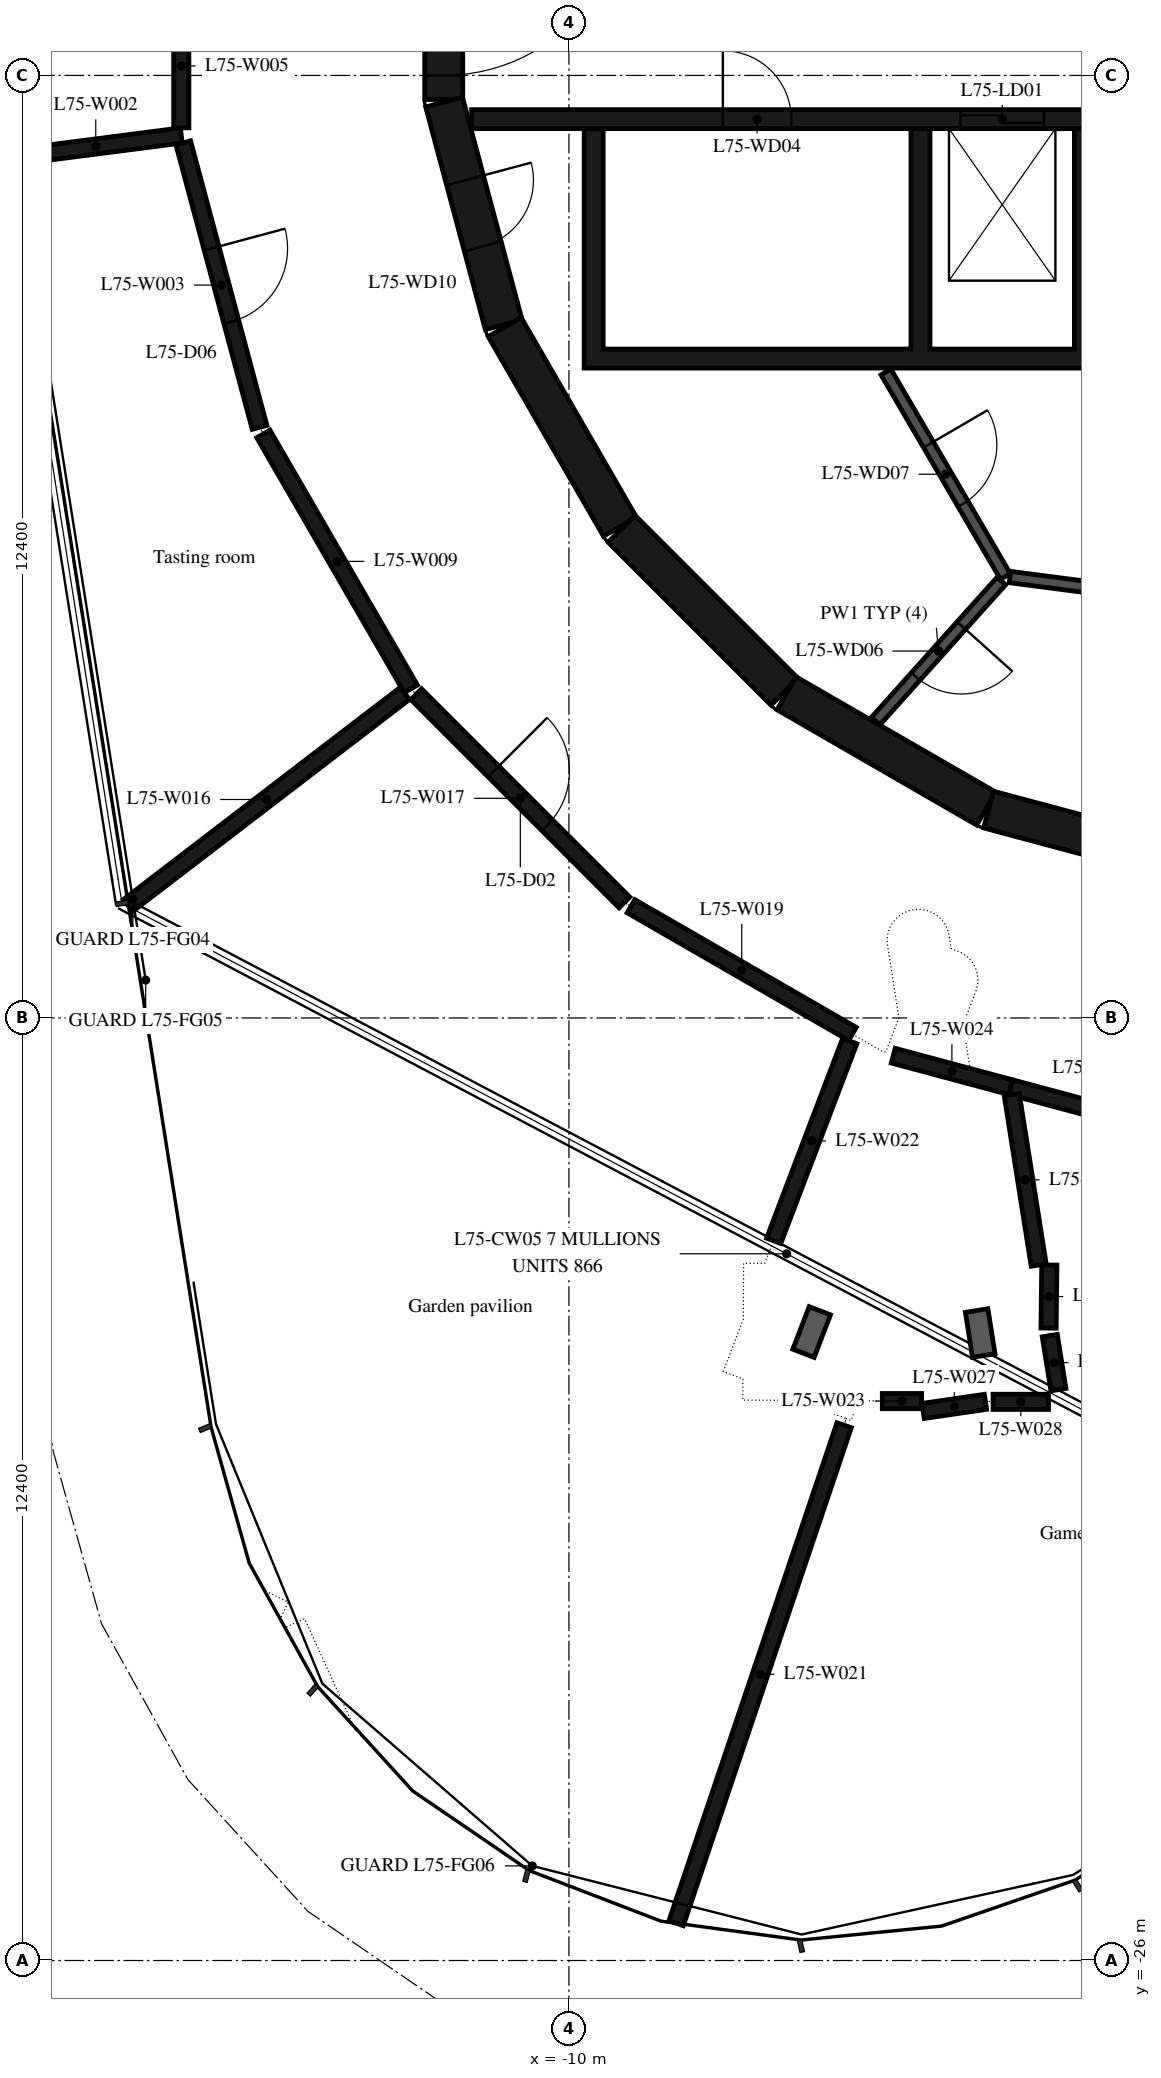
"""IFC4 building model, lengths in metres.
Left out: names, types, materials, properties, quantities, classifications, styles, units other than length and angle.
Written with IfcOpenShell. Run it as: python <this file> out.ifc"""

import sys

from ifc_helpers import new_model, si_unit, direction, frame, frame_2d, origin, place, context, subcontext, project, spatial, polyline, rectangle, outline, extrude, element, fill, save


model = new_model("IFC4")
c1 = context("Model", 3, precision=1e-05, world=origin(), true_north=direction((0.0, 1.0)))
c2 = subcontext(c1, "Body", "Model", "MODEL_VIEW")
j1 = project(units=[si_unit("LENGTHUNIT", "METRE"), si_unit("PLANEANGLEUNIT", "RADIAN")], contexts=[c1])
p1 = place(None, origin())
s1 = spatial("IfcSite", under=j1, at=p1, CompositionType="ELEMENT")
p2 = place(p1, origin())
s2 = spatial("IfcBuilding", under=s1, at=p2, CompositionType="ELEMENT")
p3 = place(p2, frame((0.0, 0.0, 291.4)))
s3 = spatial("IfcBuildingStorey", under=s2, at=p3, CompositionType="ELEMENT", Elevation=291.4)
p4 = place(p3, frame((-11.647, 1.516, 0.0), z_axis=(0.0, 0.0, 1.0), x_axis=(0.0, -1.0, 0.0)))
e1 = element("IfcWall", 1, at=p4, inside=s3, PredefinedType="SHEAR", context=c2, shape_type="SweptSolid", body=[
    extrude(rectangle(XDim=3.033, YDim=0.5, at=frame_2d((1.516, 0.0))), origin(), (0.0, 0.0, 1.0), 6.35),
])
p5 = place(p4, frame((0.316, 0.0, 0.0)))
e2 = element("IfcOpeningElement", 2, at=p5, cuts=e1, PredefinedType="OPENING", context=c2, shape_type="SweptSolid", body=[
    extrude(rectangle(XDim=2.4, YDim=2.1, at=frame_2d((1.2, 1.05))), frame((0.0, 0.26, 0.0), z_axis=(0.0, -1.0, 0.0), x_axis=(1.0, 0.0, 0.0)), (0.0, 0.0, 1.0), 0.52),
])
p6 = place(p3, frame((-11.643, -1.55, 0.0), z_axis=(0.0, 0.0, 1.0), x_axis=(0.258734743916, -0.965948410781, 0.0)))
e3 = element("IfcWall", 3, at=p6, inside=s3, PredefinedType="SHEAR", context=c2, shape_type="SweptSolid", body=[
    extrude(rectangle(XDim=3.033, YDim=0.5, at=frame_2d((1.516, 0.0))), origin(), (0.0, 0.0, 1.0), 6.35),
])
p7 = place(p6, frame((1.066, 0.0, 0.0)))
e4 = element("IfcOpeningElement", 4, at=p7, cuts=e3, PredefinedType="OPENING", context=c2, shape_type="SweptSolid", body=[
    extrude(rectangle(XDim=0.9, YDim=2.1, at=frame_2d((0.45, 1.05))), frame((0.0, 0.26, 0.0), z_axis=(0.0, -1.0, 0.0), x_axis=(1.0, 0.0, 0.0)), (0.0, 0.0, 1.0), 0.52),
])
p8 = place(p3, frame((-10.845, -4.51, 0.0), z_axis=(0.0, 0.0, 1.0), x_axis=(0.500087131594, -0.865975092491, 0.0)))
e5 = element("IfcWall", 5, at=p8, inside=s3, PredefinedType="SHEAR", context=c2, shape_type="SweptSolid", body=[
    extrude(rectangle(XDim=3.033, YDim=0.5, at=frame_2d((1.516, 0.0))), origin(), (0.0, 0.0, 1.0), 6.35),
])
p9 = place(p3, frame((-9.308, -7.164, 0.0), z_axis=(0.0, 0.0, 1.0), x_axis=(0.707106781187, -0.707106781187, 0.0)))
e6 = element("IfcWall", 6, at=p9, inside=s3, PredefinedType="SHEAR", context=c2, shape_type="SweptSolid", body=[
    extrude(rectangle(XDim=3.032, YDim=0.5, at=frame_2d((1.516, 0.0))), origin(), (0.0, 0.0, 1.0), 6.35),
])
for number, where, z_axis, x_axis in (
    (7, (-7.137, -9.329, 0.0), (0.0, 0.0, 1.0), (0.866, -0.5, 0.0)),
    (8, (-4.479, -10.858, 0.0), (0.0, 0.0, 1.0), (0.966, -0.259, 0.0)),
):
    element("IfcWall", number, at=place(p3, frame(where, z_axis=z_axis, x_axis=x_axis)), inside=s3, PredefinedType="SHEAR", context=c2, shape_type="SweptSolid", body=[
        extrude(rectangle(XDim=3.033, YDim=0.5, at=frame_2d((1.516, 0.0))), origin(), (0.0, 0.0, 1.0), 6.35),
    ])
p10 = place(p3, origin())
e9 = element("IfcWall", 9, at=p10, inside=s3, PredefinedType="SHEAR", context=c2, shape_type="SweptSolid", body=[
    extrude(outline(polyline([(9.8, -5.05), (9.8, -4.8), (9.8, -1.9), (9.55, -1.9), (9.55, -4.8), (7.65, -4.8), (7.65, -1.9), (7.4, -1.9), (7.4, -4.8), (5.5, -4.8), (5.5, -1.9), (5.25, -1.9), (5.25, -4.8), (3.35, -4.8), (3.35, -1.9), (3.1, -1.9), (3.1, -4.8), (1.2, -4.8), (1.2, -1.9), (0.95, -1.9), (0.95, -4.8), (-0.95, -4.8), (-0.95, -1.9), (-1.2, -1.9), (-1.2, -4.8), (-3.1, -4.8), (-3.1, -1.9), (-3.35, -1.9), (-3.35, -4.8), (-5.25, -4.8), (-5.25, -1.9), (-5.5, -1.9), (-5.5, -4.8), (-9.55, -4.8), (-9.55, -1.9), (-9.8, -1.9), (-9.8, -4.8), (-9.8, -5.05), (9.8, -5.05)])), origin(), (0.0, 0.0, 1.0), 6.35),
])
p11 = place(p3, frame((-11.28, -1.775, 0.0), z_axis=(0.0, 0.0, 1.0), x_axis=(1.0, 0.0, 0.0)))
e10 = element("IfcWall", 10, at=p11, inside=s3, PredefinedType="SHEAR", context=c2, shape_type="SweptSolid", body=[
    extrude(rectangle(XDim=14.38, YDim=0.25, at=frame_2d((7.19, 0.0))), origin(), (0.0, 0.0, 1.0), 6.35),
])
p12 = place(p11, frame((6.43, 0.0, 0.0)))
e11 = element("IfcOpeningElement", 11, at=p12, cuts=e10, PredefinedType="OPENING", context=c2, shape_type="SweptSolid", body=[
    extrude(rectangle(XDim=1.1, YDim=2.1, at=frame_2d((0.55, 1.05))), frame((0.0, 0.135, 0.0), z_axis=(0.0, -1.0, 0.0), x_axis=(1.0, 0.0, 0.0)), (0.0, 0.0, 1.0), 0.27),
])
p13 = place(p11, frame((8.58, 0.0, 0.0)))
e12 = element("IfcOpeningElement", 12, at=p13, cuts=e10, PredefinedType="OPENING", context=c2, shape_type="SweptSolid", body=[
    extrude(rectangle(XDim=1.1, YDim=2.1, at=frame_2d((0.55, 1.05))), frame((0.0, 0.135, 0.0), z_axis=(0.0, -1.0, 0.0), x_axis=(1.0, 0.0, 0.0)), (0.0, 0.0, 1.0), 0.27),
])
p14 = place(p11, frame((10.73, 0.0, 0.0)))
e13 = element("IfcOpeningElement", 13, at=p14, cuts=e10, PredefinedType="OPENING", context=c2, shape_type="SweptSolid", body=[
    extrude(rectangle(XDim=1.1, YDim=2.1, at=frame_2d((0.55, 1.05))), frame((0.0, 0.135, 0.0), z_axis=(0.0, -1.0, 0.0), x_axis=(1.0, 0.0, 0.0)), (0.0, 0.0, 1.0), 0.27),
])
p15 = place(p11, frame((3.305, 0.0, 0.0)))
e14 = element("IfcOpeningElement", 14, at=p15, cuts=e10, PredefinedType="OPENING", context=c2, shape_type="SweptSolid", body=[
    extrude(rectangle(XDim=0.9, YDim=2.1, at=frame_2d((0.45, 1.05))), frame((0.0, 0.135, 0.0), z_axis=(0.0, -1.0, 0.0), x_axis=(1.0, 0.0, 0.0)), (0.0, 0.0, 1.0), 0.27),
])
p16 = place(p11, frame((12.98, 0.0, 0.0)))
e15 = element("IfcOpeningElement", 15, at=p16, cuts=e10, PredefinedType="OPENING", context=c2, shape_type="SweptSolid", body=[
    extrude(rectangle(XDim=0.9, YDim=2.1, at=frame_2d((0.45, 1.05))), frame((0.0, 0.135, 0.0), z_axis=(0.0, -1.0, 0.0), x_axis=(1.0, 0.0, 0.0)), (0.0, 0.0, 1.0), 0.27),
])
p17 = place(p3, frame((-5.829, -5.102, 0.0), z_axis=(0.0, 0.0, 1.0), x_axis=(0.504480008384, -0.863423373057, 0.0)))
e16 = element("IfcWall", 16, at=p17, inside=s3, PredefinedType="PARTITIONING", context=c2, shape_type="SweptSolid", body=[
    extrude(rectangle(XDim=3.115, YDim=0.15, at=frame_2d((1.558, 0.0))), origin(), (0.0, 0.0, 1.0), 6.35),
])
p18 = place(p17, frame((1.107, 0.0, 0.0)))
e17 = element("IfcOpeningElement", 17, at=p18, cuts=e16, PredefinedType="OPENING", context=c2, shape_type="SweptSolid", body=[
    extrude(rectangle(XDim=0.9, YDim=2.1, at=frame_2d((0.45, 1.05))), frame((0.0, 0.085, 0.0), z_axis=(0.0, -1.0, 0.0), x_axis=(1.0, 0.0, 0.0)), (0.0, 0.0, 1.0), 0.17),
])
p19 = place(p3, frame((-4.311, -7.851, 0.0), z_axis=(0.0, 0.0, 1.0), x_axis=(-0.667869133096, -0.744278725383, 0.0)))
e18 = element("IfcWall", 18, at=p19, inside=s3, PredefinedType="PARTITIONING", context=c2, shape_type="SweptSolid", body=[
    extrude(rectangle(XDim=2.476, YDim=0.15, at=frame_2d((1.238, 0.0))), origin(), (0.0, 0.0, 1.0), 6.35),
])
p20 = place(p19, frame((0.788, 0.0, 0.0)))
e19 = element("IfcOpeningElement", 19, at=p20, cuts=e18, PredefinedType="OPENING", context=c2, shape_type="SweptSolid", body=[
    extrude(rectangle(XDim=0.9, YDim=2.1, at=frame_2d((0.45, 1.05))), frame((0.0, 0.085, 0.0), z_axis=(0.0, -1.0, 0.0), x_axis=(1.0, 0.0, 0.0)), (0.0, 0.0, 1.0), 0.17),
])
p21 = place(p3, frame((-4.198, -7.799, 0.0), z_axis=(0.0, 0.0, 1.0), x_axis=(0.991686747293, -0.128675542523, 0.0)))
e20 = element("IfcWall", 20, at=p21, inside=s3, PredefinedType="PARTITIONING", context=c2, shape_type="SweptSolid", body=[
    extrude(rectangle(XDim=1.793, YDim=0.15, at=frame_2d((0.896, 0.0))), origin(), (0.0, 0.0, 1.0), 6.35),
])
p22 = place(p3, frame((-17.35, -2.28, 0.0), z_axis=(0.0, 0.0, 1.0), x_axis=(0.991793720609, 0.127848409297, 0.0)))
e21 = element("IfcWall", 21, at=p22, inside=s3, PredefinedType="PARTITIONING", context=c2, shape_type="SweptSolid", body=[
    extrude(rectangle(XDim=2.269, YDim=0.2, at=frame_2d((1.134, 0.0))), origin(), (0.0, 0.0, 1.0), 6.35),
])
p23 = place(p3, frame((-15.074, -2.087, 0.0), z_axis=(0.0, 0.0, 1.0), x_axis=(0.259026804199, -0.965870133458, 0.0)))
e22 = element("IfcWall", 22, at=p23, inside=s3, PredefinedType="PARTITIONING", context=c2, shape_type="SweptSolid", body=[
    extrude(rectangle(XDim=3.876, YDim=0.2, at=frame_2d((1.938, 0.0))), origin(), (0.0, 0.0, 1.0), 6.35),
])
p24 = place(p23, frame((1.438, 0.0, 0.0)))
e23 = element("IfcOpeningElement", 23, at=p24, cuts=e22, PredefinedType="OPENING", context=c2, shape_type="SweptSolid", body=[
    extrude(rectangle(XDim=1.0, YDim=2.1, at=frame_2d((0.5, 1.05))), frame((0.0, 0.11, 0.0), z_axis=(0.0, -1.0, 0.0), x_axis=(1.0, 0.0, 0.0)), (0.0, 0.0, 1.0), 0.22),
])
p25 = place(p3, frame((-15.1, -0.26, 0.0), z_axis=(0.0, 0.0, 1.0), x_axis=(0.0, -1.0, 0.0)))
e24 = element("IfcWall", 24, at=p25, inside=s3, PredefinedType="PARTITIONING", context=c2, shape_type="SweptSolid", body=[
    extrude(rectangle(XDim=1.63, YDim=0.2, at=frame_2d((0.815, 0.0))), origin(), (0.0, 0.0, 1.0), 6.35),
])
p26 = place(p3, frame((-14.02, -5.917, 0.0), z_axis=(0.0, 0.0, 1.0), x_axis=(0.500733182901, -0.865601686425, 0.0)))
e25 = element("IfcWall", 25, at=p26, inside=s3, PredefinedType="PARTITIONING", context=c2, shape_type="SweptSolid", body=[
    extrude(rectangle(XDim=3.874, YDim=0.2, at=frame_2d((1.937, 0.0))), origin(), (0.0, 0.0, 1.0), 6.35),
])
p27 = place(p3, frame((-12.159, -9.331, 0.0), z_axis=(0.0, 0.0, 1.0), x_axis=(-0.793799954034, -0.608178948152, 0.0)))
e26 = element("IfcWall", 26, at=p27, inside=s3, PredefinedType="PARTITIONING", context=c2, shape_type="SweptSolid", body=[
    extrude(rectangle(XDim=4.586, YDim=0.2, at=frame_2d((2.293, 0.0))), origin(), (0.0, 0.0, 1.0), 6.35),
])
p28 = place(p3, frame((-12.009, -9.341, 0.0), z_axis=(0.0, 0.0, 1.0), x_axis=(0.707106781187, -0.707106781187, 0.0)))
e27 = element("IfcWall", 27, at=p28, inside=s3, PredefinedType="PARTITIONING", context=c2, shape_type="SweptSolid", body=[
    extrude(rectangle(XDim=3.874, YDim=0.2, at=frame_2d((1.937, 0.0))), origin(), (0.0, 0.0, 1.0), 6.35),
])
p29 = place(p28, frame((1.437, 0.0, 0.0)))
e28 = element("IfcOpeningElement", 28, at=p29, cuts=e27, PredefinedType="OPENING", context=c2, shape_type="SweptSolid", body=[
    extrude(rectangle(XDim=1.0, YDim=2.1, at=frame_2d((0.5, 1.05))), frame((0.0, 0.11, 0.0), z_axis=(0.0, -1.0, 0.0), x_axis=(1.0, 0.0, 0.0)), (0.0, 0.0, 1.0), 0.22),
])
p30 = place(p3, frame((-9.183, -12.13, 0.0), z_axis=(0.0, 0.0, 1.0), x_axis=(0.866261714877, -0.499590473626, 0.0)))
e29 = element("IfcWall", 29, at=p30, inside=s3, PredefinedType="PARTITIONING", context=c2, shape_type="SweptSolid", body=[
    extrude(rectangle(XDim=3.363, YDim=0.2, at=frame_2d((1.682, 0.0))), origin(), (0.0, 0.0, 1.0), 6.35),
])
p31 = place(p3, frame((-6.38, -18.958, 0.0), z_axis=(0.0, 0.0, 1.0), x_axis=(-0.319668100728, -0.947529580212, 0.0)))
e30 = element("IfcWall", 30, at=p31, inside=s3, PredefinedType="PARTITIONING", context=c2, shape_type="SweptSolid", body=[
    extrude(rectangle(XDim=6.915, YDim=0.2, at=frame_2d((3.458, 0.0))), origin(), (0.0, 0.0, 1.0), 6.35),
])
p32 = place(p3, frame((-6.306, -13.904, 0.0), z_axis=(0.0, 0.0, 1.0), x_axis=(-0.355847310917, -0.934544108811, 0.0)))
e31 = element("IfcWall", 31, at=p32, inside=s3, PredefinedType="PARTITIONING", context=c2, shape_type="SweptSolid", body=[
    extrude(rectangle(XDim=2.812, YDim=0.2, at=frame_2d((1.406, 0.0))), origin(), (0.0, 0.0, 1.0), 6.35),
])
p33 = place(p3, frame((-5.877, -18.64, 0.0), z_axis=(0.0, 0.0, 1.0), x_axis=(1.0, 0.0, 0.0)))
e32 = element("IfcWall", 32, at=p33, inside=s3, PredefinedType="PARTITIONING", context=c2, shape_type="SweptSolid", body=[
    extrude(rectangle(XDim=0.517, YDim=0.2, at=frame_2d((0.259, 0.0))), origin(), (0.0, 0.0, 1.0), 6.35),
])
p34 = place(p3, frame((-5.733, -14.096, 0.0), z_axis=(0.0, 0.0, 1.0), x_axis=(0.965848432571, -0.259107709845, 0.0)))
e33 = element("IfcWall", 33, at=p34, inside=s3, PredefinedType="PARTITIONING", context=c2, shape_type="SweptSolid", body=[
    extrude(rectangle(XDim=1.598, YDim=0.2, at=frame_2d((0.799, 0.0))), origin(), (0.0, 0.0, 1.0), 6.35),
])
p35 = place(p3, frame((-5.34, -18.77, 0.0), z_axis=(0.0, 0.0, 1.0), x_axis=(0.9894425278, 0.144925788532, 0.0)))
e34 = element("IfcWall", 34, at=p35, inside=s3, PredefinedType="PARTITIONING", context=c2, shape_type="SweptSolid", body=[
    extrude(rectangle(XDim=0.829, YDim=0.2, at=frame_2d((0.415, 0.0))), origin(), (0.0, 0.0, 1.0), 6.35),
])
p36 = place(p3, frame((-4.42, -18.65, 0.0), z_axis=(0.0, 0.0, 1.0), x_axis=(1.0, 0.0, 0.0)))
e35 = element("IfcWall", 35, at=p36, inside=s3, PredefinedType="PARTITIONING", context=c2, shape_type="SweptSolid", body=[
    extrude(rectangle(XDim=0.73, YDim=0.2, at=frame_2d((0.365, 0.0))), origin(), (0.0, 0.0, 1.0), 6.35),
])
p37 = place(p3, frame((-4.19, -14.51, 0.0), z_axis=(0.0, 0.0, 1.0), x_axis=(0.965858538716, -0.259070035299, 0.0)))
e36 = element("IfcWall", 36, at=p37, inside=s3, PredefinedType="PARTITIONING", context=c2, shape_type="SweptSolid", body=[
    extrude(rectangle(XDim=2.278, YDim=0.2, at=frame_2d((1.139, 0.0))), origin(), (0.0, 0.0, 1.0), 6.35),
])
p38 = place(p3, frame((-3.82, -16.85, 0.0), z_axis=(0.0, 0.0, 1.0), x_axis=(-0.156122803255, 0.98773765257, 0.0)))
e37 = element("IfcWall", 37, at=p38, inside=s3, PredefinedType="PARTITIONING", context=c2, shape_type="SweptSolid", body=[
    extrude(rectangle(XDim=2.269, YDim=0.2, at=frame_2d((1.135, 0.0))), origin(), (0.0, 0.0, 1.0), 6.35),
])
p39 = place(p3, frame((-3.69, -17.68, 0.0), z_axis=(0.0, 0.0, 1.0), x_axis=(0.012061493839, 0.999927257537, 0.0)))
e38 = element("IfcWall", 38, at=p39, inside=s3, PredefinedType="PARTITIONING", context=c2, shape_type="SweptSolid", body=[
    extrude(rectangle(XDim=0.83, YDim=0.2, at=frame_2d((0.415, 0.0))), origin(), (0.0, 0.0, 1.0), 6.35),
])
p40 = place(p3, frame((-3.56, -18.49, 0.0), z_axis=(0.0, 0.0, 1.0), x_axis=(-0.158294553347, 0.987391935546, 0.0)))
e39 = element("IfcWall", 39, at=p40, inside=s3, PredefinedType="PARTITIONING", context=c2, shape_type="SweptSolid", body=[
    extrude(rectangle(XDim=0.72, YDim=0.2, at=frame_2d((0.36, 0.0))), origin(), (0.0, 0.0, 1.0), 6.35),
])
p41 = place(p5, origin())
e40 = element("IfcDoor", 40, at=p41, inside=s3, OperationType="DOUBLE_DOOR_SINGLE_SWING", PredefinedType="DOOR", context=c2, shape_type="SweptSolid", body=[
    extrude(rectangle(XDim=2.4, YDim=2.1, at=frame_2d((1.2, 1.05))), frame((0.0, 0.025, 0.0), z_axis=(0.0, -1.0, 0.0), x_axis=(1.0, 0.0, 0.0)), (0.0, 0.0, 1.0), 0.05),
])
fill(e2, e40)
p42 = place(p12, origin())
e41 = element("IfcDoor", 41, at=p42, inside=s3, OperationType="DOUBLE_DOOR_SLIDING", PredefinedType="DOOR", context=c2, shape_type="SweptSolid", body=[
    extrude(rectangle(XDim=1.1, YDim=2.1, at=frame_2d((0.55, 1.05))), frame((0.0, 0.025, 0.0), z_axis=(0.0, -1.0, 0.0), x_axis=(1.0, 0.0, 0.0)), (0.0, 0.0, 1.0), 0.05),
])
fill(e11, e41)
p43 = place(p15, origin())
e42 = element("IfcDoor", 42, at=p43, inside=s3, OperationType="SINGLE_SWING_RIGHT", PredefinedType="DOOR", context=c2, shape_type="SweptSolid", body=[
    extrude(rectangle(XDim=0.9, YDim=2.1, at=frame_2d((0.45, 1.05))), frame((0.0, 0.025, 0.0), z_axis=(0.0, -1.0, 0.0), x_axis=(1.0, 0.0, 0.0)), (0.0, 0.0, 1.0), 0.05),
])
fill(e14, e42)
p44 = place(p20, origin())
e43 = element("IfcDoor", 43, at=p44, inside=s3, OperationType="SINGLE_SWING_RIGHT", PredefinedType="DOOR", context=c2, shape_type="SweptSolid", body=[
    extrude(rectangle(XDim=0.9, YDim=2.1, at=frame_2d((0.45, 1.05))), frame((0.0, 0.025, 0.0), z_axis=(0.0, -1.0, 0.0), x_axis=(1.0, 0.0, 0.0)), (0.0, 0.0, 1.0), 0.05),
])
fill(e19, e43)
p45 = place(p18, origin())
e44 = element("IfcDoor", 44, at=p45, inside=s3, OperationType="SINGLE_SWING_LEFT", PredefinedType="DOOR", context=c2, shape_type="SweptSolid", body=[
    extrude(rectangle(XDim=0.9, YDim=2.1, at=frame_2d((0.45, 1.05))), frame((0.0, 0.025, 0.0), z_axis=(0.0, -1.0, 0.0), x_axis=(1.0, 0.0, 0.0)), (0.0, 0.0, 1.0), 0.05),
])
fill(e17, e44)
p46 = place(p7, origin())
e45 = element("IfcDoor", 45, at=p46, inside=s3, OperationType="SINGLE_SWING_RIGHT", PredefinedType="DOOR", context=c2, shape_type="SweptSolid", body=[
    extrude(rectangle(XDim=0.9, YDim=2.1, at=frame_2d((0.45, 1.05))), frame((0.0, 0.025, 0.0), z_axis=(0.0, -1.0, 0.0), x_axis=(1.0, 0.0, 0.0)), (0.0, 0.0, 1.0), 0.05),
])
fill(e4, e45)
p47 = place(p29, origin())
e46 = element("IfcDoor", 46, at=p47, inside=s3, OperationType="SINGLE_SWING_LEFT", PredefinedType="DOOR", context=c2, shape_type="SweptSolid", body=[
    extrude(rectangle(XDim=1.0, YDim=2.1, at=frame_2d((0.5, 1.05))), frame((0.0, 0.025, 0.0), z_axis=(0.0, -1.0, 0.0), x_axis=(1.0, 0.0, 0.0)), (0.0, 0.0, 1.0), 0.05),
])
fill(e28, e46)
p48 = place(p24, origin())
e47 = element("IfcDoor", 47, at=p48, inside=s3, OperationType="SINGLE_SWING_LEFT", PredefinedType="DOOR", context=c2, shape_type="SweptSolid", body=[
    extrude(rectangle(XDim=1.0, YDim=2.1, at=frame_2d((0.5, 1.05))), frame((0.0, 0.025, 0.0), z_axis=(0.0, -1.0, 0.0), x_axis=(1.0, 0.0, 0.0)), (0.0, 0.0, 1.0), 0.05),
])
fill(e23, e47)
save(model, sys.argv[1])
